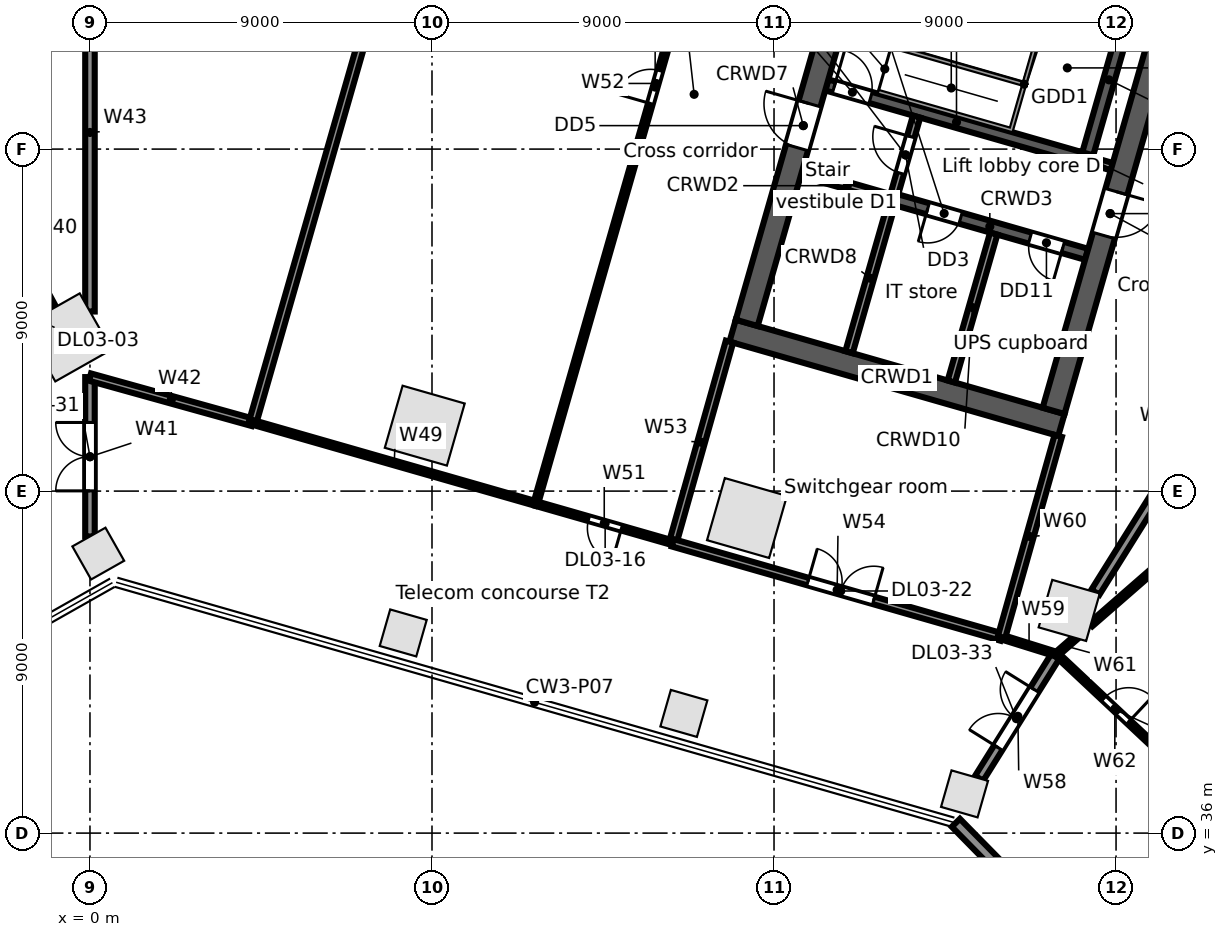
"""IFC4 building model, lengths in metres.
Left out: names, types, materials, properties, quantities, classifications, styles, units other than length and angle.
Written with IfcOpenShell. Run it as: python <this file> out.ifc"""

import sys

from ifc_helpers import new_model, si_unit, direction, frame, frame_2d, origin, origin_2d, place, context, subcontext, project, spatial, rectangle, extrude, element, fill, save


model = new_model("IFC4")
c1 = context("Model", 3, precision=1e-05, world=origin(), true_north=direction((0.0, 1.0)))
c2 = subcontext(c1, "Body", "Model", "MODEL_VIEW")
j1 = project(units=[si_unit("LENGTHUNIT", "METRE"), si_unit("PLANEANGLEUNIT", "RADIAN")], contexts=[c1])
p1 = place(None, origin())
s1 = spatial("IfcSite", under=j1, at=p1, CompositionType="ELEMENT")
p2 = place(p1, origin())
s2 = spatial("IfcBuilding", under=s1, at=p2, CompositionType="ELEMENT")
p3 = place(p2, frame((0.0, 0.0, 16.5)))
s3 = spatial("IfcBuildingStorey", under=s2, at=p3, CompositionType="ELEMENT", Elevation=16.5)
for number, where, z_axis, x_axis in (
    (1, (-0.591, 49.044, 0.0), (0.0, 0.0, 1.0), (0.87, 0.492, 0.0)),
    (2, (8.81, 46.722, 0.0), (0.0, 0.0, 1.0), (0.961, -0.276, 0.0)),
    (3, (17.288, 44.291, 0.0), (0.0, 0.0, 1.0), (0.961, -0.276, 0.0)),
):
    element("IfcColumn", number, at=place(p3, frame(where, z_axis=z_axis, x_axis=x_axis)), inside=s3, PredefinedType="COLUMN", context=c2, shape_type="SweptSolid", body=[
        extrude(rectangle(XDim=1.7, YDim=1.7, at=origin_2d()), origin(), (0.0, 0.0, 1.0), 5.0),
    ])
p4 = place(p3, frame((25.767, 41.86, 0.0), z_axis=(0.0, 0.0, 1.0), x_axis=(0.961261695938, -0.275637355817, 0.0)))
e4 = element("IfcColumn", 4, at=p4, inside=s3, PredefinedType="COLUMN", context=c2, shape_type="SweptSolid", body=[
    extrude(rectangle(XDim=1.3, YDim=1.3, at=origin_2d()), origin(), (0.0, 0.0, 1.0), 5.0),
])
for number, where, z_axis, x_axis in (
    (5, (0.219, 43.355, 0.0), (0.0, 0.0, 1.0), (0.87, 0.492, 0.0)),
    (6, (8.243, 41.267, 0.0), (0.0, 0.0, 1.0), (0.961, -0.276, 0.0)),
    (7, (15.628, 39.149, 0.0), (0.0, 0.0, 1.0), (0.961, -0.276, 0.0)),
    (8, (23.013, 37.032, 0.0), (0.0, 0.0, 1.0), (0.961, -0.276, 0.0)),
):
    element("IfcColumn", number, at=place(p3, frame(where, z_axis=z_axis, x_axis=x_axis)), inside=s3, PredefinedType="COLUMN", context=c2, shape_type="SweptSolid", body=[
        extrude(rectangle(XDim=1.0, YDim=1.0, at=origin_2d()), origin(), (0.0, 0.0, 1.0), 5.0),
    ])
p5 = place(p3, frame((36.376, 22.44, 0.0), z_axis=(0.0, 0.0, 1.0), x_axis=(-0.700917061273, 0.713242787006, 0.0)))
e9 = element("IfcWall", 9, at=p5, inside=s3, PredefinedType="STANDARD", context=c2, shape_type="SweptSolid", body=[
    extrude(rectangle(XDim=19.391, YDim=0.3, at=frame_2d((9.696, 0.0))), origin(), (0.0, 0.0, 1.0), 4.65),
])
p6 = place(p3, frame((16.911, 49.221, 0.0), z_axis=(0.0, 0.0, 1.0), x_axis=(0.96126248289, -0.275634611374, 0.0)))
e10 = element("IfcWall", 10, at=p6, inside=s3, PredefinedType="SOLIDWALL", context=c2, shape_type="SweptSolid", body=[
    extrude(rectangle(XDim=9.0, YDim=0.6, at=frame_2d((4.5, 0.0))), origin(), (0.0, 0.0, 1.0), 4.65),
])
p7 = place(p3, frame((18.728, 53.382, 0.0), z_axis=(0.0, 0.0, 1.0), x_axis=(0.961247070632, -0.275688355216, 0.0)))
e11 = element("IfcWall", 11, at=p7, inside=s3, PredefinedType="SOLIDWALL", context=c2, shape_type="SweptSolid", body=[
    extrude(rectangle(XDim=2.5, YDim=0.2, at=frame_2d((1.25, 0.0))), origin(), (0.0, 0.0, 1.0), 4.65),
])
p8 = place(p3, frame((21.131, 52.692, 0.0), z_axis=(0.0, 0.0, 1.0), x_axis=(0.961271492568, -0.275603188616, 0.0)))
e12 = element("IfcWall", 12, at=p8, inside=s3, PredefinedType="SOLIDWALL", context=c2, shape_type="SweptSolid", body=[
    extrude(rectangle(XDim=5.3, YDim=0.3, at=frame_2d((2.65, 0.0))), origin(), (0.0, 0.0, 1.0), 4.65),
])
p9 = place(p8, frame((0.95, 0.0, 0.0)))
e13 = element("IfcOpeningElement", 13, at=p9, cuts=e12, PredefinedType="OPENING", context=c2, shape_type="SweptSolid", body=[
    extrude(rectangle(XDim=0.9, YDim=2.1, at=frame_2d((0.45, 1.05))), frame((0.0, 0.16, 0.0), z_axis=(0.0, -1.0, 0.0), x_axis=(1.0, 0.0, 0.0)), (0.0, 0.0, 1.0), 0.32),
])
p10 = place(p8, frame((3.75, 0.0, 0.0)))
e14 = element("IfcOpeningElement", 14, at=p10, cuts=e12, PredefinedType="OPENING", context=c2, shape_type="SweptSolid", body=[
    extrude(rectangle(XDim=0.9, YDim=2.1, at=frame_2d((0.45, 1.05))), frame((0.0, 0.16, 0.0), z_axis=(0.0, -1.0, 0.0), x_axis=(1.0, 0.0, 0.0)), (0.0, 0.0, 1.0), 0.32),
])
p11 = place(p3, frame((19.389, 55.689, 0.0), z_axis=(0.0, 0.0, 1.0), x_axis=(0.961261397636, -0.275638396117, 0.0)))
e15 = element("IfcWall", 15, at=p11, inside=s3, PredefinedType="SOLIDWALL", context=c2, shape_type="SweptSolid", body=[
    extrude(rectangle(XDim=7.1, YDim=0.3, at=frame_2d((3.55, 0.0))), origin(), (0.0, 0.0, 1.0), 4.65),
])
p12 = place(p11, frame((0.2, 0.0, 0.0)))
e16 = element("IfcOpeningElement", 16, at=p12, cuts=e15, PredefinedType="OPENING", context=c2, shape_type="SweptSolid", body=[
    extrude(rectangle(XDim=1.0, YDim=2.1, at=frame_2d((0.5, 1.05))), frame((0.0, 0.16, 0.0), z_axis=(0.0, -1.0, 0.0), x_axis=(1.0, 0.0, 0.0)), (0.0, 0.0, 1.0), 0.32),
])
p13 = place(p3, frame((26.214, 53.732, 0.0), z_axis=(0.0, 0.0, 1.0), x_axis=(0.96122076476, -0.27578005982, 0.0)))
e17 = element("IfcWall", 17, at=p13, inside=s3, PredefinedType="SOLIDWALL", context=c2, shape_type="SweptSolid", body=[
    extrude(rectangle(XDim=0.7, YDim=0.2, at=frame_2d((0.35, 0.0))), origin(), (0.0, 0.0, 1.0), 4.65),
])
p14 = place(p3, frame((17.282, 49.427, 0.0), z_axis=(0.0, 0.0, 1.0), x_axis=(0.275631631629, 0.961263337304, 0.0)))
e18 = element("IfcWall", 18, at=p14, inside=s3, PredefinedType="SOLIDWALL", context=c2, shape_type="SweptSolid", body=[
    extrude(rectangle(XDim=10.8, YDim=0.6, at=frame_2d((5.4, 0.0))), origin(), (0.0, 0.0, 1.0), 4.65),
])
p15 = place(p14, frame((4.8, 0.0, 0.0)))
e19 = element("IfcOpeningElement", 19, at=p15, cuts=e18, PredefinedType="OPENING", context=c2, shape_type="SweptSolid", body=[
    extrude(rectangle(XDim=1.2, YDim=2.1, at=frame_2d((0.6, 1.05))), frame((0.0, 0.31, 0.0), z_axis=(0.0, -1.0, 0.0), x_axis=(1.0, 0.0, 0.0)), (0.0, 0.0, 1.0), 0.62),
])
p16 = place(p3, frame((19.973, 48.655, 0.0), z_axis=(0.0, 0.0, 1.0), x_axis=(0.275668441653, 0.961252781674, 0.0)))
e20 = element("IfcWall", 20, at=p16, inside=s3, PredefinedType="SOLIDWALL", context=c2, shape_type="SweptSolid", body=[
    extrude(rectangle(XDim=4.05, YDim=0.2, at=frame_2d((2.025, 0.0))), origin(), (0.0, 0.0, 1.0), 4.65),
])
p17 = place(p3, frame((21.172, 52.837, 0.0), z_axis=(0.0, 0.0, 1.0), x_axis=(0.275657676022, 0.961255868981, 0.0)))
e21 = element("IfcWall", 21, at=p17, inside=s3, PredefinedType="PARTITIONING", context=c2, shape_type="SweptSolid", body=[
    extrude(rectangle(XDim=2.1, YDim=0.2, at=frame_2d((1.05, 0.0))), origin(), (0.0, 0.0, 1.0), 4.65),
])
p18 = place(p17, frame((0.55, 0.0, 0.0)))
e22 = element("IfcOpeningElement", 22, at=p18, cuts=e21, PredefinedType="OPENING", context=c2, shape_type="SweptSolid", body=[
    extrude(rectangle(XDim=1.0, YDim=2.1, at=frame_2d((0.5, 1.05))), frame((0.0, 0.11, 0.0), z_axis=(0.0, -1.0, 0.0), x_axis=(1.0, 0.0, 0.0)), (0.0, 0.0, 1.0), 0.22),
])
p19 = place(p3, frame((22.665, 47.883, 0.0), z_axis=(0.0, 0.0, 1.0), x_axis=(0.275596769212, 0.961273333033, 0.0)))
e23 = element("IfcWall", 23, at=p19, inside=s3, PredefinedType="PARTITIONING", context=c2, shape_type="SweptSolid", body=[
    extrude(rectangle(XDim=4.05, YDim=0.2, at=frame_2d((2.025, 0.0))), origin(), (0.0, 0.0, 1.0), 4.65),
])
p20 = place(p3, frame((26.256, 53.876, 0.0), z_axis=(0.0, 0.0, 1.0), x_axis=(0.275612739511, 0.961268754209, 0.0)))
e24 = element("IfcWall", 24, at=p20, inside=s3, PredefinedType="SOLIDWALL", context=c2, shape_type="SweptSolid", body=[
    extrude(rectangle(XDim=4.05, YDim=0.3, at=frame_2d((2.025, 0.0))), origin(), (0.0, 0.0, 1.0), 4.65),
])
p21 = place(p3, frame((25.356, 47.112, 0.0), z_axis=(0.0, 0.0, 1.0), x_axis=(0.275631631629, 0.961263337304, 0.0)))
e25 = element("IfcWall", 25, at=p21, inside=s3, PredefinedType="SOLIDWALL", context=c2, shape_type="SweptSolid", body=[
    extrude(rectangle(XDim=10.8, YDim=0.6, at=frame_2d((5.4, 0.0))), origin(), (0.0, 0.0, 1.0), 4.65),
])
p22 = place(p21, frame((4.8, 0.0, 0.0)))
e26 = element("IfcOpeningElement", 26, at=p22, cuts=e25, PredefinedType="OPENING", context=c2, shape_type="SweptSolid", body=[
    extrude(rectangle(XDim=1.2, YDim=2.1, at=frame_2d((0.6, 1.05))), frame((0.0, 0.31, 0.0), z_axis=(0.0, -1.0, 0.0), x_axis=(1.0, 0.0, 0.0)), (0.0, 0.0, 1.0), 0.62),
])
p23 = place(p3, frame((-1.883, 51.467, 0.0), z_axis=(0.0, 0.0, 1.0), x_axis=(0.477162952876, -0.878814836244, 0.0)))
e27 = element("IfcWall", 27, at=p23, inside=s3, PredefinedType="PARTITIONING", context=c2, shape_type="SweptSolid", body=[
    extrude(rectangle(XDim=1.895, YDim=0.2, at=frame_2d((0.947, 0.0))), origin(), (0.0, 0.0, 1.0), 4.65),
])
p24 = place(p3, frame((0.0, 43.806, 0.0), z_axis=(0.0, 0.0, 1.0), x_axis=(0.0, 1.0, 0.0)))
e28 = element("IfcWall", 28, at=p24, inside=s3, PredefinedType="PARTITIONING", context=c2, shape_type="SweptSolid", body=[
    extrude(rectangle(XDim=4.194, YDim=0.25, at=frame_2d((2.097, 0.0))), origin(), (0.0, 0.0, 1.0), 3.712),
])
p25 = place(p24, frame((1.2, 0.0, 0.0)))
e29 = element("IfcOpeningElement", 29, at=p25, cuts=e28, PredefinedType="OPENING", context=c2, shape_type="SweptSolid", body=[
    extrude(rectangle(XDim=1.8, YDim=2.1, at=frame_2d((0.9, 1.05))), frame((0.0, 0.135, 0.0), z_axis=(0.0, -1.0, 0.0), x_axis=(1.0, 0.0, 0.0)), (0.0, 0.0, 1.0), 0.27),
])
p26 = place(p3, frame((0.0, 48.0, 0.0), z_axis=(0.0, 0.0, 1.0), x_axis=(0.963400508162, -0.268066150181, 0.0)))
e30 = element("IfcWall", 30, at=p26, inside=s3, PredefinedType="PARTITIONING", context=c2, shape_type="SweptSolid", body=[
    extrude(rectangle(XDim=4.443, YDim=0.2, at=frame_2d((2.221, 0.0))), origin(), (0.0, 0.0, 1.0), 4.65),
])
p27 = place(p3, frame((0.0, 49.726, 0.0), z_axis=(0.0, 0.0, 1.0), x_axis=(0.0, 1.0, 0.0)))
e31 = element("IfcWall", 31, at=p27, inside=s3, PredefinedType="PARTITIONING", context=c2, shape_type="SweptSolid", body=[
    extrude(rectangle(XDim=9.424, YDim=0.25, at=frame_2d((4.712, 0.0))), origin(), (0.0, 0.0, 1.0), 4.65),
])
p28 = place(p3, frame((4.28, 46.809, 0.0), z_axis=(0.0, 0.0, 1.0), x_axis=(0.27566906052, 0.961252604195, 0.0)))
e32 = element("IfcWall", 32, at=p28, inside=s3, PredefinedType="PARTITIONING", context=c2, shape_type="SweptSolid", body=[
    extrude(rectangle(XDim=20.985, YDim=0.2, at=frame_2d((10.493, 0.0))), origin(), (0.0, 0.0, 1.0), 3.712),
])
p29 = place(p3, frame((4.28, 46.809, 0.0), z_axis=(0.0, 0.0, 1.0), x_axis=(0.961270337968, -0.275607215693, 0.0)))
e33 = element("IfcWall", 33, at=p29, inside=s3, PredefinedType="PARTITIONING", context=c2, shape_type="SweptSolid", body=[
    extrude(rectangle(XDim=7.75, YDim=0.125, at=frame_2d((3.875, 0.0))), origin(), (0.0, 0.0, 1.0), 4.03),
])
p30 = place(p3, frame((11.73, 44.673, 0.0), z_axis=(0.0, 0.0, 1.0), x_axis=(0.961228613303, -0.275752702557, 0.0)))
e34 = element("IfcWall", 34, at=p30, inside=s3, PredefinedType="PARTITIONING", context=c2, shape_type="SweptSolid", body=[
    extrude(rectangle(XDim=3.75, YDim=0.125, at=frame_2d((1.875, 0.0))), origin(), (0.0, 0.0, 1.0), 4.65),
])
p31 = place(p30, frame((1.45, 0.0, 0.0)))
e35 = element("IfcOpeningElement", 35, at=p31, cuts=e34, PredefinedType="OPENING", context=c2, shape_type="SweptSolid", body=[
    extrude(rectangle(XDim=0.9, YDim=2.1, at=frame_2d((0.45, 1.05))), frame((0.0, 0.073, 0.0), z_axis=(0.0, -1.0, 0.0), x_axis=(1.0, 0.0, 0.0)), (0.0, 0.0, 1.0), 0.145),
])
p32 = place(p3, frame((11.73, 44.673, 0.0), z_axis=(0.0, 0.0, 1.0), x_axis=(0.275616869382, 0.961267570093, 0.0)))
e36 = element("IfcWall", 36, at=p32, inside=s3, PredefinedType="PARTITIONING", context=c2, shape_type="SweptSolid", body=[
    extrude(rectangle(XDim=23.0, YDim=0.125, at=frame_2d((11.5, 0.0))), origin(), (0.0, 0.0, 1.0), 3.712),
])
p33 = place(p32, frame((10.95, 0.0, 0.0)))
e37 = element("IfcOpeningElement", 37, at=p33, cuts=e36, PredefinedType="OPENING", context=c2, shape_type="SweptSolid", body=[
    extrude(rectangle(XDim=0.9, YDim=2.1, at=frame_2d((0.45, 1.05))), frame((0.0, 0.073, 0.0), z_axis=(0.0, -1.0, 0.0), x_axis=(1.0, 0.0, 0.0)), (0.0, 0.0, 1.0), 0.145),
])
p34 = place(p3, frame((15.335, 43.639, 0.0), z_axis=(0.0, 0.0, 1.0), x_axis=(0.271407455373, 0.962464541252, 0.0)))
e38 = element("IfcWall", 38, at=p34, inside=s3, PredefinedType="PARTITIONING", context=c2, shape_type="SweptSolid", body=[
    extrude(rectangle(XDim=5.501, YDim=0.2, at=frame_2d((2.75, 0.0))), origin(), (0.0, 0.0, 1.0), 3.93),
])
p35 = place(p3, frame((15.335, 43.639, 0.0), z_axis=(0.0, 0.0, 1.0), x_axis=(0.961281982754, -0.275566597455, 0.0)))
e39 = element("IfcWall", 39, at=p35, inside=s3, PredefinedType="PARTITIONING", context=c2, shape_type="SweptSolid", body=[
    extrude(rectangle(XDim=9.0, YDim=0.2, at=frame_2d((4.5, 0.0))), origin(), (0.0, 0.0, 1.0), 3.822),
])
p36 = place(p35, frame((3.7, 0.0, 0.0)))
e40 = element("IfcOpeningElement", 40, at=p36, cuts=e39, PredefinedType="OPENING", context=c2, shape_type="SweptSolid", body=[
    extrude(rectangle(XDim=1.8, YDim=2.1, at=frame_2d((0.9, 1.05))), frame((0.0, 0.11, 0.0), z_axis=(0.0, -1.0, 0.0), x_axis=(1.0, 0.0, 0.0)), (0.0, 0.0, 1.0), 0.22),
])
p37 = place(p3, frame((23.397, 37.442, 0.0), z_axis=(0.0, 0.0, 1.0), x_axis=(0.529805058875, 0.848119448893, 0.0)))
e41 = element("IfcWall", 41, at=p37, inside=s3, PredefinedType="PARTITIONING", context=c2, shape_type="SweptSolid", body=[
    extrude(rectangle(XDim=3.849, YDim=0.25, at=frame_2d((1.924, 0.0))), origin(), (0.0, 0.0, 1.0), 3.712),
])
p38 = place(p37, frame((0.95, 0.0, 0.0)))
e42 = element("IfcOpeningElement", 42, at=p38, cuts=e41, PredefinedType="OPENING", context=c2, shape_type="SweptSolid", body=[
    extrude(rectangle(XDim=1.8, YDim=2.1, at=frame_2d((0.9, 1.05))), frame((0.0, 0.135, 0.0), z_axis=(0.0, -1.0, 0.0), x_axis=(1.0, 0.0, 0.0)), (0.0, 0.0, 1.0), 0.27),
])
p39 = place(p3, frame((23.986, 41.159, 0.0), z_axis=(0.0, 0.0, 1.0), x_axis=(0.954522865266, -0.298137719325, 0.0)))
e43 = element("IfcWall", 43, at=p39, inside=s3, PredefinedType="PARTITIONING", context=c2, shape_type="SweptSolid", body=[
    extrude(rectangle(XDim=1.519, YDim=0.125, at=frame_2d((0.76, 0.0))), origin(), (0.0, 0.0, 1.0), 3.712),
])
p40 = place(p3, frame((23.986, 41.159, 0.0), z_axis=(0.0, 0.0, 1.0), x_axis=(0.271465437068, 0.962448188983, 0.0)))
e44 = element("IfcWall", 44, at=p40, inside=s3, PredefinedType="PARTITIONING", context=c2, shape_type="SweptSolid", body=[
    extrude(rectangle(XDim=5.5, YDim=0.2, at=frame_2d((2.75, 0.0))), origin(), (0.0, 0.0, 1.0), 3.93),
])
p41 = place(p3, frame((25.436, 40.706, 0.0), z_axis=(0.0, 0.0, 1.0), x_axis=(0.753521944961, 0.657422754749, 0.0)))
e45 = element("IfcWall", 45, at=p41, inside=s3, PredefinedType="PARTITIONING", context=c2, shape_type="SweptSolid", body=[
    extrude(rectangle(XDim=0.656, YDim=0.125, at=frame_2d((0.328, 0.0))), origin(), (0.0, 0.0, 1.0), 4.65),
])
p42 = place(p3, frame((25.436, 40.706, 0.0), z_axis=(0.0, 0.0, 1.0), x_axis=(0.729011488135, -0.684501461041, 0.0)))
e46 = element("IfcWall", 46, at=p42, inside=s3, PredefinedType="PARTITIONING", context=c2, shape_type="SweptSolid", body=[
    extrude(rectangle(XDim=4.202, YDim=0.125, at=frame_2d((2.101, 0.0))), origin(), (0.0, 0.0, 1.0), 4.65),
])
p43 = place(p42, frame((1.7, 0.0, 0.0)))
e47 = element("IfcOpeningElement", 47, at=p43, cuts=e46, PredefinedType="OPENING", context=c2, shape_type="SweptSolid", body=[
    extrude(rectangle(XDim=0.9, YDim=2.1, at=frame_2d((0.45, 1.05))), frame((0.0, 0.073, 0.0), z_axis=(0.0, -1.0, 0.0), x_axis=(1.0, 0.0, 0.0)), (0.0, 0.0, 1.0), 0.145),
])
p44 = place(p3, frame((26.338, 41.492, 0.0), z_axis=(0.0, 0.0, 1.0), x_axis=(0.753866696092, 0.657027400131, 0.0)))
e48 = element("IfcWall", 48, at=p44, inside=s3, PredefinedType="PARTITIONING", context=c2, shape_type="SweptSolid", body=[
    extrude(rectangle(XDim=10.493, YDim=0.125, at=frame_2d((5.246, 0.0))), origin(), (0.0, 0.0, 1.0), 3.73),
])
p45 = place(p44, frame((4.7, 0.0, 0.0)))
e49 = element("IfcOpeningElement", 49, at=p45, cuts=e48, PredefinedType="OPENING", context=c2, shape_type="SweptSolid", body=[
    extrude(rectangle(XDim=0.9, YDim=2.1, at=frame_2d((0.45, 1.05))), frame((0.0, 0.073, 0.0), z_axis=(0.0, -1.0, 0.0), x_axis=(1.0, 0.0, 0.0)), (0.0, 0.0, 1.0), 0.145),
])
p46 = place(p3, frame((26.456, 42.338, 0.0), z_axis=(0.0, 0.0, 1.0), x_axis=(0.529866075757, 0.848081329686, 0.0)))
e50 = element("IfcWall", 50, at=p46, inside=s3, PredefinedType="PARTITIONING", context=c2, shape_type="SweptSolid", body=[
    extrude(rectangle(XDim=10.076, YDim=0.25, at=frame_2d((5.038, 0.0))), origin(), (0.0, 0.0, 1.0), 3.712),
])
p47 = place(p12, origin())
e51 = element("IfcDoor", 51, at=p47, inside=s3, OperationType="SINGLE_SWING_LEFT", PredefinedType="DOOR", context=c2, shape_type="SweptSolid", body=[
    extrude(rectangle(XDim=1.0, YDim=2.1, at=frame_2d((0.5, 1.05))), frame((0.0, 0.025, 0.0), z_axis=(0.0, -1.0, 0.0), x_axis=(1.0, 0.0, 0.0)), (0.0, 0.0, 1.0), 0.05),
])
fill(e16, e51)
p48 = place(p18, origin())
e52 = element("IfcDoor", 52, at=p48, inside=s3, OperationType="SINGLE_SWING_RIGHT", PredefinedType="DOOR", context=c2, shape_type="SweptSolid", body=[
    extrude(rectangle(XDim=1.0, YDim=2.1, at=frame_2d((0.5, 1.05))), frame((0.0, 0.025, 0.0), z_axis=(0.0, -1.0, 0.0), x_axis=(1.0, 0.0, 0.0)), (0.0, 0.0, 1.0), 0.05),
])
fill(e22, e52)
p49 = place(p15, origin())
e53 = element("IfcDoor", 53, at=p49, inside=s3, OperationType="SINGLE_SWING_RIGHT", PredefinedType="DOOR", context=c2, shape_type="SweptSolid", body=[
    extrude(rectangle(XDim=1.2, YDim=2.1, at=frame_2d((0.6, 1.05))), frame((0.0, 0.025, 0.0), z_axis=(0.0, -1.0, 0.0), x_axis=(1.0, 0.0, 0.0)), (0.0, 0.0, 1.0), 0.05),
])
fill(e19, e53)
p50 = place(p22, frame((1.2, 0.0, 0.0), z_axis=(0.0, 0.0, 1.0), x_axis=(-1.0, 0.0, 0.0)))
e54 = element("IfcDoor", 54, at=p50, inside=s3, OperationType="SINGLE_SWING_LEFT", PredefinedType="DOOR", context=c2, shape_type="SweptSolid", body=[
    extrude(rectangle(XDim=1.2, YDim=2.1, at=frame_2d((0.6, 1.05))), frame((0.0, 0.025, 0.0), z_axis=(0.0, -1.0, 0.0), x_axis=(1.0, 0.0, 0.0)), (0.0, 0.0, 1.0), 0.05),
])
fill(e26, e54)
p51 = place(p9, frame((0.9, 0.0, 0.0), z_axis=(0.0, 0.0, 1.0), x_axis=(-1.0, 0.0, 0.0)))
e55 = element("IfcDoor", 55, at=p51, inside=s3, OperationType="SINGLE_SWING_RIGHT", PredefinedType="DOOR", context=c2, shape_type="SweptSolid", body=[
    extrude(rectangle(XDim=0.9, YDim=2.1, at=frame_2d((0.45, 1.05))), frame((0.0, 0.025, 0.0), z_axis=(0.0, -1.0, 0.0), x_axis=(1.0, 0.0, 0.0)), (0.0, 0.0, 1.0), 0.05),
])
fill(e13, e55)
p52 = place(p10, frame((0.9, 0.0, 0.0), z_axis=(0.0, 0.0, 1.0), x_axis=(-1.0, 0.0, 0.0)))
e56 = element("IfcDoor", 56, at=p52, inside=s3, OperationType="SINGLE_SWING_LEFT", PredefinedType="DOOR", context=c2, shape_type="SweptSolid", body=[
    extrude(rectangle(XDim=0.9, YDim=2.1, at=frame_2d((0.45, 1.05))), frame((0.0, 0.025, 0.0), z_axis=(0.0, -1.0, 0.0), x_axis=(1.0, 0.0, 0.0)), (0.0, 0.0, 1.0), 0.05),
])
fill(e14, e56)
p53 = place(p31, frame((0.9, 0.0, 0.0), z_axis=(0.0, 0.0, 1.0), x_axis=(-1.0, 0.0, 0.0)))
e57 = element("IfcDoor", 57, at=p53, inside=s3, OperationType="SINGLE_SWING_LEFT", PredefinedType="DOOR", context=c2, shape_type="SweptSolid", body=[
    extrude(rectangle(XDim=0.9, YDim=2.1, at=frame_2d((0.45, 1.05))), frame((0.0, 0.025, 0.0), z_axis=(0.0, -1.0, 0.0), x_axis=(1.0, 0.0, 0.0)), (0.0, 0.0, 1.0), 0.05),
])
fill(e35, e57)
p54 = place(p33, origin())
e58 = element("IfcDoor", 58, at=p54, inside=s3, OperationType="SINGLE_SWING_LEFT", PredefinedType="DOOR", context=c2, shape_type="SweptSolid", body=[
    extrude(rectangle(XDim=0.9, YDim=2.1, at=frame_2d((0.45, 1.05))), frame((0.0, 0.025, 0.0), z_axis=(0.0, -1.0, 0.0), x_axis=(1.0, 0.0, 0.0)), (0.0, 0.0, 1.0), 0.05),
])
fill(e37, e58)
p55 = place(p36, origin())
e59 = element("IfcDoor", 59, at=p55, inside=s3, OperationType="DOUBLE_DOOR_SINGLE_SWING", PredefinedType="DOOR", context=c2, shape_type="SweptSolid", body=[
    extrude(rectangle(XDim=1.8, YDim=2.1, at=frame_2d((0.9, 1.05))), frame((0.0, 0.025, 0.0), z_axis=(0.0, -1.0, 0.0), x_axis=(1.0, 0.0, 0.0)), (0.0, 0.0, 1.0), 0.05),
])
fill(e40, e59)
p56 = place(p43, origin())
e60 = element("IfcDoor", 60, at=p56, inside=s3, OperationType="SINGLE_SWING_RIGHT", PredefinedType="DOOR", context=c2, shape_type="SweptSolid", body=[
    extrude(rectangle(XDim=0.9, YDim=2.1, at=frame_2d((0.45, 1.05))), frame((0.0, 0.025, 0.0), z_axis=(0.0, -1.0, 0.0), x_axis=(1.0, 0.0, 0.0)), (0.0, 0.0, 1.0), 0.05),
])
fill(e47, e60)
p57 = place(p25, origin())
e61 = element("IfcDoor", 61, at=p57, inside=s3, OperationType="DOUBLE_DOOR_SINGLE_SWING", PredefinedType="DOOR", context=c2, shape_type="SweptSolid", body=[
    extrude(rectangle(XDim=1.8, YDim=2.1, at=frame_2d((0.9, 1.05))), frame((0.0, 0.025, 0.0), z_axis=(0.0, -1.0, 0.0), x_axis=(1.0, 0.0, 0.0)), (0.0, 0.0, 1.0), 0.05),
])
fill(e29, e61)
p58 = place(p38, origin())
e62 = element("IfcDoor", 62, at=p58, inside=s3, OperationType="DOUBLE_DOOR_SINGLE_SWING", PredefinedType="DOOR", context=c2, shape_type="SweptSolid", body=[
    extrude(rectangle(XDim=1.8, YDim=2.1, at=frame_2d((0.9, 1.05))), frame((0.0, 0.025, 0.0), z_axis=(0.0, -1.0, 0.0), x_axis=(1.0, 0.0, 0.0)), (0.0, 0.0, 1.0), 0.05),
])
fill(e42, e62)
save(model, sys.argv[1])
